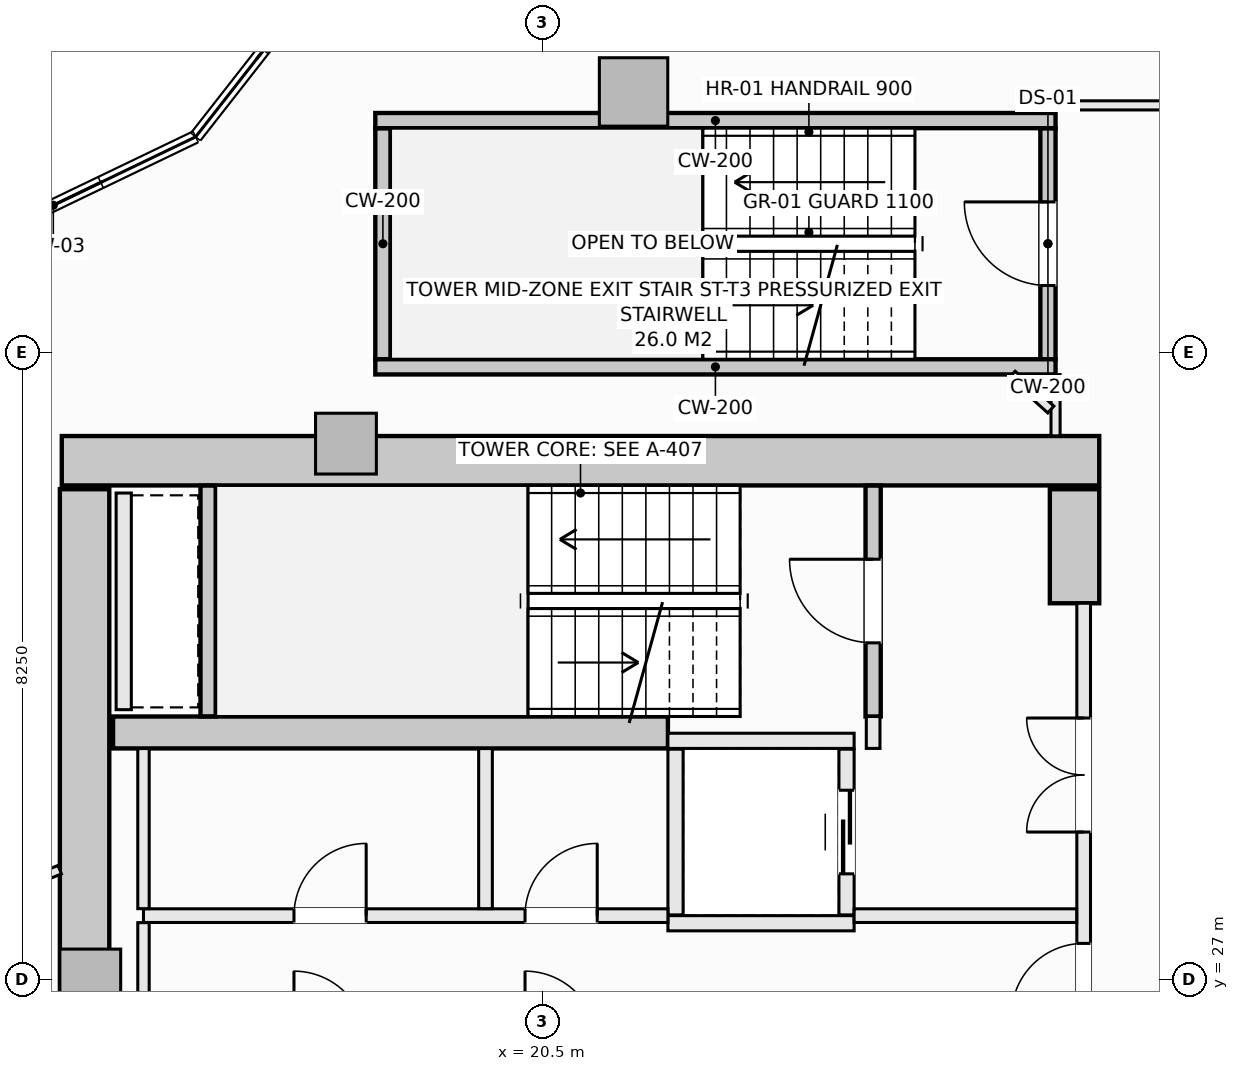
"""IFC4 building model, lengths in metres.
Left out: names, types, materials, properties, quantities, classifications, styles, units other than length and angle.
Written with IfcOpenShell. Run it as: python <this file> out.ifc"""

import sys

from ifc_helpers import new_model, si_unit, direction, frame, frame_2d, origin, origin_2d, place, context, subcontext, project, spatial, rectangle, extrude, element, fill, save


model = new_model("IFC4")
c1 = context("Model", 3, precision=1e-05, world=origin(), true_north=direction((0.0, 1.0)))
c2 = subcontext(c1, "Body", "Model", "MODEL_VIEW")
j1 = project(units=[si_unit("LENGTHUNIT", "METRE"), si_unit("PLANEANGLEUNIT", "RADIAN")], contexts=[c1])
p1 = place(None, origin())
s1 = spatial("IfcSite", under=j1, at=p1, CompositionType="ELEMENT")
p2 = place(p1, origin())
s2 = spatial("IfcBuilding", under=s1, at=p2, CompositionType="ELEMENT")
p3 = place(p2, frame((0.0, 0.0, 149.5)))
s3 = spatial("IfcBuildingStorey", under=s2, at=p3, CompositionType="ELEMENT", Elevation=149.5)
p4 = place(p3, frame((14.175, 33.825, -0.27), z_axis=(0.0, 0.0, 1.0), x_axis=(1.0, 0.0, 0.0)))
e1 = element("IfcWall", 1, at=p4, inside=s3, PredefinedType="SHEAR", context=c2, shape_type="SweptSolid", body=[
    extrude(rectangle(XDim=13.65, YDim=0.65, at=frame_2d((6.825, 0.0))), origin(), (0.0, 0.0, 1.0), 3.4),
])
p5 = place(p3, frame((14.475, 20.55, -0.27), z_axis=(0.0, 0.0, 1.0), x_axis=(0.0, 1.0, 0.0)))
e2 = element("IfcWall", 2, at=p5, inside=s3, PredefinedType="SHEAR", context=c2, shape_type="SweptSolid", body=[
    extrude(rectangle(XDim=12.9, YDim=0.65, at=frame_2d((6.45, 0.0))), origin(), (0.0, 0.0, 1.0), 3.4),
])
p6 = place(p3, frame((27.5, 31.95, -0.27), z_axis=(0.0, 0.0, 1.0), x_axis=(0.0, 1.0, 0.0)))
e3 = element("IfcWall", 3, at=p6, inside=s3, PredefinedType="SHEAR", context=c2, shape_type="SweptSolid", body=[
    extrude(rectangle(XDim=1.5, YDim=0.65, at=frame_2d((0.75, 0.0))), origin(), (0.0, 0.0, 1.0), 3.4),
])
p7 = place(p3, frame((14.85, 30.25, -0.27), z_axis=(0.0, 0.0, 1.0), x_axis=(1.0, 0.0, 0.0)))
e4 = element("IfcWall", 4, at=p7, inside=s3, PredefinedType="SHEAR", context=c2, shape_type="SweptSolid", body=[
    extrude(rectangle(XDim=7.3, YDim=0.42, at=frame_2d((3.65, 0.0))), origin(), (0.0, 0.0, 1.0), 3.4),
])
p8 = place(p3, frame((21.698, 38.677, -0.27), z_axis=(0.0, 0.0, 1.0), x_axis=(1.0, 0.0, 0.0)))
e5 = element("IfcColumn", 5, at=p8, inside=s3, PredefinedType="COLUMN", context=c2, shape_type="SweptSolid", body=[
    extrude(rectangle(XDim=0.9, YDim=0.9, at=origin_2d()), origin(), (0.0, 0.0, 1.0), 3.4),
])
for number, where, z_axis, x_axis in (
    (6, (17.914, 34.05, -0.27), (0.0, 0.0, 1.0), (1.0, 0.0, 0.0)),
    (7, (14.55, 27.0, -0.27), (0.0, 0.0, 1.0), (1.0, 0.0, 0.0)),
):
    element("IfcColumn", number, at=place(p3, frame(where, z_axis=z_axis, x_axis=x_axis)), inside=s3, PredefinedType="PILASTER", context=c2, shape_type="SweptSolid", body=[
        extrude(rectangle(XDim=0.8, YDim=0.8, at=origin_2d()), origin(), (0.0, 0.0, 1.0), 3.4),
    ])
p9 = place(p3, frame((24.85, 30.46, -0.27), z_axis=(0.0, 0.0, 1.0), x_axis=(0.0, 1.0, 0.0)))
e8 = element("IfcWall", 8, at=p9, inside=s3, PredefinedType="SHEAR", context=c2, shape_type="SweptSolid", body=[
    extrude(rectangle(XDim=3.038, YDim=0.2, at=frame_2d((1.519, 0.0))), origin(), (0.0, 0.0, 1.0), 3.4),
])
p10 = place(p9, frame((0.969, 0.0, 0.27)))
e9 = element("IfcOpeningElement", 9, at=p10, cuts=e8, PredefinedType="OPENING", context=c2, shape_type="SweptSolid", body=[
    extrude(rectangle(XDim=1.1, YDim=2.15, at=frame_2d((0.55, 1.075))), frame((0.0, 0.11, 0.0), z_axis=(0.0, -1.0, 0.0), x_axis=(1.0, 0.0, 0.0)), (0.0, 0.0, 1.0), 0.22),
])
p11 = place(p3, frame((16.1, 30.462, -0.27), z_axis=(0.0, 0.0, 1.0), x_axis=(0.0, 1.0, 0.0)))
e10 = element("IfcWall", 10, at=p11, inside=s3, PredefinedType="SHEAR", context=c2, shape_type="SweptSolid", body=[
    extrude(rectangle(XDim=3.036, YDim=0.2, at=frame_2d((1.518, 0.0))), origin(), (0.0, 0.0, 1.0), 3.4),
])
p12 = place(p3, frame((27.15, 35.16, -0.27), z_axis=(0.0, 0.0, 1.0), x_axis=(0.0, 1.0, 0.0)))
e11 = element("IfcWall", 11, at=p12, inside=s3, PredefinedType="SHEAR", context=c2, shape_type="SweptSolid", body=[
    extrude(rectangle(XDim=3.04, YDim=0.2, at=frame_2d((1.52, 0.0))), origin(), (0.0, 0.0, 1.0), 3.4),
])
p13 = place(p12, frame((0.97, 0.0, 0.27)))
e12 = element("IfcOpeningElement", 12, at=p13, cuts=e11, PredefinedType="OPENING", context=c2, shape_type="SweptSolid", body=[
    extrude(rectangle(XDim=1.1, YDim=2.15, at=frame_2d((0.55, 1.075))), frame((0.0, 0.11, 0.0), z_axis=(0.0, -1.0, 0.0), x_axis=(1.0, 0.0, 0.0)), (0.0, 0.0, 1.0), 0.22),
])
p14 = place(p3, frame((18.4, 35.16, -0.27), z_axis=(0.0, 0.0, 1.0), x_axis=(0.0, 1.0, 0.0)))
e13 = element("IfcWall", 13, at=p14, inside=s3, PredefinedType="SHEAR", context=c2, shape_type="SweptSolid", body=[
    extrude(rectangle(XDim=3.04, YDim=0.2, at=frame_2d((1.52, 0.0))), origin(), (0.0, 0.0, 1.0), 3.4),
])
for number, where, z_axis, x_axis in (
    (14, (18.3, 38.3, -0.27), (0.0, 0.0, 1.0), (1.0, 0.0, 0.0)),
    (15, (18.3, 35.06, -0.27), (0.0, 0.0, 1.0), (1.0, 0.0, 0.0)),
):
    element("IfcWall", number, at=place(p3, frame(where, z_axis=z_axis, x_axis=x_axis)), inside=s3, PredefinedType="SHEAR", context=c2, shape_type="SweptSolid", body=[
        extrude(rectangle(XDim=8.95, YDim=0.2, at=frame_2d((4.475, 0.0))), origin(), (0.0, 0.0, 1.0), 3.4),
    ])
for number, where, z_axis, x_axis in (
    (16, (22.15, 30.14, 0.0), (0.0, 0.0, 1.0), (1.0, 0.0, 0.0)),
    (17, (22.15, 27.74, 0.0), (0.0, 0.0, 1.0), (1.0, 0.0, 0.0)),
):
    element("IfcWall", number, at=place(p3, frame(where, z_axis=z_axis, x_axis=x_axis)), inside=s3, PredefinedType="SOLIDWALL", context=c2, shape_type="SweptSolid", body=[
        extrude(rectangle(XDim=2.45, YDim=0.2, at=frame_2d((1.225, 0.0))), origin(), (0.0, 0.0, 1.0), 3.13),
    ])
p15 = place(p3, frame((22.25, 27.85, 0.0), z_axis=(0.0, 0.0, 1.0), x_axis=(0.0, 1.0, 0.0)))
e18 = element("IfcWall", 18, at=p15, inside=s3, PredefinedType="SOLIDWALL", context=c2, shape_type="SweptSolid", body=[
    extrude(rectangle(XDim=2.18, YDim=0.2, at=frame_2d((1.09, 0.0))), origin(), (0.0, 0.0, 1.0), 3.13),
])
p16 = place(p3, frame((24.5, 27.85, 0.0), z_axis=(0.0, 0.0, 1.0), x_axis=(0.0, 1.0, 0.0)))
e19 = element("IfcWall", 19, at=p16, inside=s3, PredefinedType="SOLIDWALL", context=c2, shape_type="SweptSolid", body=[
    extrude(rectangle(XDim=2.18, YDim=0.2, at=frame_2d((1.09, 0.0))), origin(), (0.0, 0.0, 1.0), 3.13),
])
p17 = place(p16, frame((0.54, 0.0, 0.0)))
e20 = element("IfcOpeningElement", 20, at=p17, cuts=e19, PredefinedType="OPENING", context=c2, shape_type="SweptSolid", body=[
    extrude(rectangle(XDim=1.1, YDim=2.2, at=frame_2d((0.55, 1.1))), frame((0.0, 0.11, 0.0), z_axis=(0.0, -1.0, 0.0), x_axis=(1.0, 0.0, 0.0)), (0.0, 0.0, 1.0), 0.22),
])
p18 = place(p3, frame((14.99, 30.55, 0.0), z_axis=(0.0, 0.0, 1.0), x_axis=(0.0, 1.0, 0.0)))
e21 = element("IfcWall", 21, at=p18, inside=s3, PredefinedType="SOLIDWALL", context=c2, shape_type="SweptSolid", body=[
    extrude(rectangle(XDim=2.85, YDim=0.2, at=frame_2d((1.425, 0.0))), origin(), (0.0, 0.0, 1.0), 3.13),
])
p19 = place(p3, frame((24.85, 30.04, 0.0), z_axis=(0.0, 0.0, 1.0), x_axis=(0.0, 1.0, 0.0)))
e22 = element("IfcWall", 22, at=p19, inside=s3, PredefinedType="SOLIDWALL", context=c2, shape_type="SweptSolid", body=[
    extrude(rectangle(XDim=0.42, YDim=0.18, at=frame_2d((0.21, 0.0))), origin(), (0.0, 0.0, 1.0), 3.13),
])
p20 = place(p3, frame((27.62, 22.05, 0.0), z_axis=(0.0, 0.0, 1.0), x_axis=(0.0, 1.0, 0.0)))
e23 = element("IfcWall", 23, at=p20, inside=s3, PredefinedType="SOLIDWALL", context=c2, shape_type="SweptSolid", body=[
    extrude(rectangle(XDim=9.9, YDim=0.18, at=frame_2d((4.95, 0.0))), origin(), (0.0, 0.0, 1.0), 3.13),
])
p21 = place(p20, frame((4.475, 0.0, 0.0)))
e24 = element("IfcOpeningElement", 24, at=p21, cuts=e23, PredefinedType="OPENING", context=c2, shape_type="SweptSolid", body=[
    extrude(rectangle(XDim=0.95, YDim=2.1, at=frame_2d((0.475, 1.05))), frame((0.0, 0.1, 0.0), z_axis=(0.0, -1.0, 0.0), x_axis=(1.0, 0.0, 0.0)), (0.0, 0.0, 1.0), 0.2),
])
p22 = place(p20, frame((6.89, 0.0, 0.0)))
e25 = element("IfcOpeningElement", 25, at=p22, cuts=e23, PredefinedType="OPENING", context=c2, shape_type="SweptSolid", body=[
    extrude(rectangle(XDim=1.5, YDim=2.2, at=frame_2d((0.75, 1.1))), frame((0.0, 0.1, 0.0), z_axis=(0.0, -1.0, 0.0), x_axis=(1.0, 0.0, 0.0)), (0.0, 0.0, 1.0), 0.2),
])
p23 = place(p20, frame((1.51, 0.0, 0.0)))
e26 = element("IfcOpeningElement", 26, at=p23, cuts=e23, PredefinedType="OPENING", context=c2, shape_type="SweptSolid", body=[
    extrude(rectangle(XDim=1.5, YDim=2.2, at=frame_2d((0.75, 1.1))), frame((0.0, 0.1, 0.0), z_axis=(0.0, -1.0, 0.0), x_axis=(1.0, 0.0, 0.0)), (0.0, 0.0, 1.0), 0.2),
])
p24 = place(p3, frame((15.25, 27.84, 0.0), z_axis=(0.0, 0.0, 1.0), x_axis=(1.0, 0.0, 0.0)))
e27 = element("IfcWall", 27, at=p24, inside=s3, PredefinedType="SOLIDWALL", context=c2, shape_type="SweptSolid", body=[
    extrude(rectangle(XDim=6.9, YDim=0.18, at=frame_2d((3.45, 0.0))), origin(), (0.0, 0.0, 1.0), 3.13),
])
p25 = place(p24, frame((5.02, 0.0, 0.0)))
e28 = element("IfcOpeningElement", 28, at=p25, cuts=e27, PredefinedType="OPENING", context=c2, shape_type="SweptSolid", body=[
    extrude(rectangle(XDim=0.95, YDim=2.1, at=frame_2d((0.475, 1.05))), frame((0.0, 0.1, 0.0), z_axis=(0.0, -1.0, 0.0), x_axis=(1.0, 0.0, 0.0)), (0.0, 0.0, 1.0), 0.2),
])
p26 = place(p24, frame((1.98, 0.0, 0.0)))
e29 = element("IfcOpeningElement", 29, at=p26, cuts=e27, PredefinedType="OPENING", context=c2, shape_type="SweptSolid", body=[
    extrude(rectangle(XDim=0.95, YDim=2.1, at=frame_2d((0.475, 1.05))), frame((0.0, 0.1, 0.0), z_axis=(0.0, -1.0, 0.0), x_axis=(1.0, 0.0, 0.0)), (0.0, 0.0, 1.0), 0.2),
])
p27 = place(p3, frame((24.6, 27.84, 0.0), z_axis=(0.0, 0.0, 1.0), x_axis=(1.0, 0.0, 0.0)))
e30 = element("IfcWall", 30, at=p27, inside=s3, PredefinedType="SOLIDWALL", context=c2, shape_type="SweptSolid", body=[
    extrude(rectangle(XDim=2.928, YDim=0.18, at=frame_2d((1.464, 0.0))), origin(), (0.0, 0.0, 1.0), 3.13),
])
p28 = place(p3, frame((15.25, 26.252, 0.0), z_axis=(0.0, 0.0, 1.0), x_axis=(0.0, 1.0, 0.0)))
e31 = element("IfcWall", 31, at=p28, inside=s3, PredefinedType="PARTITIONING", context=c2, shape_type="SweptSolid", body=[
    extrude(rectangle(XDim=1.496, YDim=0.15, at=frame_2d((0.748, 0.0))), origin(), (0.0, 0.0, 1.0), 3.13),
])
p29 = place(p3, frame((15.25, 27.932, 0.0), z_axis=(0.0, 0.0, 1.0), x_axis=(0.0, 1.0, 0.0)))
e32 = element("IfcWall", 32, at=p29, inside=s3, PredefinedType="PARTITIONING", context=c2, shape_type="SweptSolid", body=[
    extrude(rectangle(XDim=2.106, YDim=0.15, at=frame_2d((1.053, 0.0))), origin(), (0.0, 0.0, 1.0), 3.13),
])
p30 = place(p3, frame((19.75, 27.932, 0.0), z_axis=(0.0, 0.0, 1.0), x_axis=(0.0, 1.0, 0.0)))
e33 = element("IfcWall", 33, at=p30, inside=s3, PredefinedType="SOLIDWALL", context=c2, shape_type="SweptSolid", body=[
    extrude(rectangle(XDim=2.106, YDim=0.18, at=frame_2d((1.053, 0.0))), origin(), (0.0, 0.0, 1.0), 3.13),
])
p31 = place(p3, frame((27.25, 34.152, 0.0), z_axis=(0.0, 0.0, 1.0), x_axis=(0.0, 1.0, 0.0)))
e34 = element("IfcWall", 34, at=p31, inside=s3, PredefinedType="PARTITIONING", context=c2, shape_type="SweptSolid", body=[
    extrude(rectangle(XDim=0.806, YDim=0.12, at=frame_2d((0.403, 0.0))), origin(), (0.0, 0.0, 1.0), 3.13),
])
p32 = place(p3, frame((27.25, 38.5, 0.0), z_axis=(0.0, 0.0, 1.0), x_axis=(1.0, 0.0, 0.0)))
e35 = element("IfcWall", 35, at=p32, inside=s3, PredefinedType="PARTITIONING", context=c2, shape_type="SweptSolid", body=[
    extrude(rectangle(XDim=2.53, YDim=0.12, at=frame_2d((1.265, 0.0))), origin(), (0.0, 0.0, 1.0), 3.13),
])
p33 = place(p3, frame((8.479, 26.162, 0.0), z_axis=(0.0, 0.0, 1.0), x_axis=(0.927622844305, 0.373518217392, 0.0)))
e36 = element("IfcWall", 36, at=p33, inside=s3, PredefinedType="PARTITIONING", context=c2, shape_type="SweptSolid", body=[
    extrude(rectangle(XDim=6.111, YDim=0.12, at=frame_2d((3.055, 0.0))), origin(), (0.0, 0.0, 1.0), 2.505),
])
p34 = place(p3, frame((26.678, 34.958, 0.0), z_axis=(0.0, 0.0, 1.0), x_axis=(0.742975583244, -0.669318521112, 0.0)))
e37 = element("IfcWall", 37, at=p34, inside=s3, PredefinedType="PARTITIONING", context=c2, shape_type="SweptSolid", body=[
    extrude(rectangle(XDim=0.686, YDim=0.12, at=frame_2d((0.343, 0.0))), origin(), (0.0, 0.0, 1.0), 3.13),
])
p35 = place(p10, origin())
e38 = element("IfcDoor", 38, at=p35, inside=s3, OperationType="SINGLE_SWING_RIGHT", PredefinedType="DOOR", context=c2, shape_type="SweptSolid", body=[
    extrude(rectangle(XDim=1.1, YDim=2.15, at=frame_2d((0.55, 1.075))), frame((0.0, 0.025, 0.0), z_axis=(0.0, -1.0, 0.0), x_axis=(1.0, 0.0, 0.0)), (0.0, 0.0, 1.0), 0.05),
])
fill(e9, e38)
p36 = place(p13, origin())
e39 = element("IfcDoor", 39, at=p36, inside=s3, OperationType="SINGLE_SWING_RIGHT", PredefinedType="DOOR", context=c2, shape_type="SweptSolid", body=[
    extrude(rectangle(XDim=1.1, YDim=2.15, at=frame_2d((0.55, 1.075))), frame((0.0, 0.025, 0.0), z_axis=(0.0, -1.0, 0.0), x_axis=(1.0, 0.0, 0.0)), (0.0, 0.0, 1.0), 0.05),
])
fill(e12, e39)
p37 = place(p17, origin())
e40 = element("IfcDoor", 40, at=p37, inside=s3, OperationType="SLIDING_TO_LEFT", PredefinedType="DOOR", context=c2, shape_type="SweptSolid", body=[
    extrude(rectangle(XDim=1.1, YDim=2.2, at=frame_2d((0.55, 1.1))), frame((0.0, 0.025, 0.0), z_axis=(0.0, -1.0, 0.0), x_axis=(1.0, 0.0, 0.0)), (0.0, 0.0, 1.0), 0.05),
])
fill(e20, e40)
p38 = place(p21, origin())
e41 = element("IfcDoor", 41, at=p38, inside=s3, OperationType="SINGLE_SWING_LEFT", PredefinedType="DOOR", context=c2, shape_type="SweptSolid", body=[
    extrude(rectangle(XDim=0.95, YDim=2.1, at=frame_2d((0.475, 1.05))), frame((0.0, 0.025, 0.0), z_axis=(0.0, -1.0, 0.0), x_axis=(1.0, 0.0, 0.0)), (0.0, 0.0, 1.0), 0.05),
])
fill(e24, e41)
p39 = place(p22, origin())
e42 = element("IfcDoor", 42, at=p39, inside=s3, OperationType="DOUBLE_DOOR_SINGLE_SWING", PredefinedType="DOOR", context=c2, shape_type="SweptSolid", body=[
    extrude(rectangle(XDim=1.5, YDim=2.2, at=frame_2d((0.75, 1.1))), frame((0.0, 0.025, 0.0), z_axis=(0.0, -1.0, 0.0), x_axis=(1.0, 0.0, 0.0)), (0.0, 0.0, 1.0), 0.05),
])
fill(e25, e42)
p40 = place(p25, origin())
e43 = element("IfcDoor", 43, at=p40, inside=s3, OperationType="SINGLE_SWING_RIGHT", PredefinedType="DOOR", context=c2, shape_type="SweptSolid", body=[
    extrude(rectangle(XDim=0.95, YDim=2.1, at=frame_2d((0.475, 1.05))), frame((0.0, 0.025, 0.0), z_axis=(0.0, -1.0, 0.0), x_axis=(1.0, 0.0, 0.0)), (0.0, 0.0, 1.0), 0.05),
])
fill(e28, e43)
p41 = place(p26, origin())
e44 = element("IfcDoor", 44, at=p41, inside=s3, OperationType="SINGLE_SWING_RIGHT", PredefinedType="DOOR", context=c2, shape_type="SweptSolid", body=[
    extrude(rectangle(XDim=0.95, YDim=2.1, at=frame_2d((0.475, 1.05))), frame((0.0, 0.025, 0.0), z_axis=(0.0, -1.0, 0.0), x_axis=(1.0, 0.0, 0.0)), (0.0, 0.0, 1.0), 0.05),
])
fill(e29, e44)
save(model, sys.argv[1])
